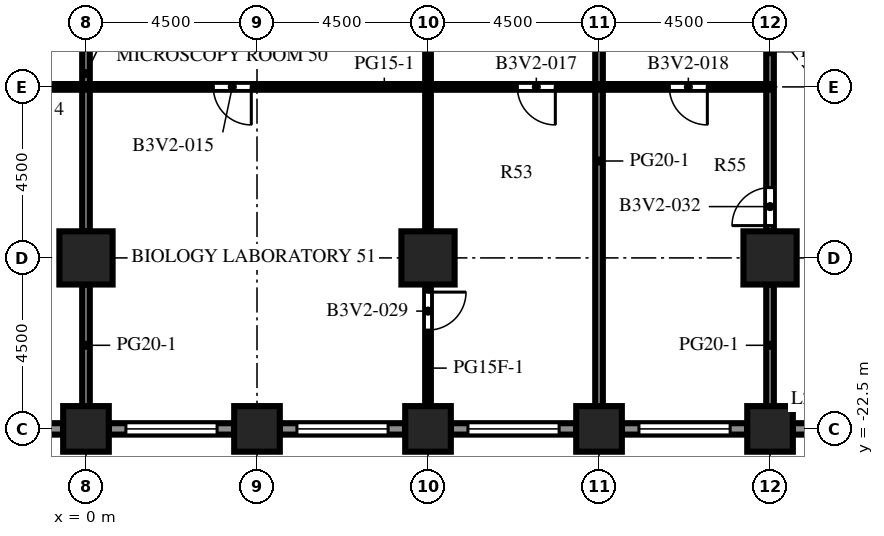
"""IFC4 building model, lengths in metres.
Left out: names, types, materials, properties, quantities, classifications, styles, units other than length and angle.
Written with IfcOpenShell. Run it as: python <this file> out.ifc"""

import sys

from ifc_helpers import new_model, si_unit, direction, frame, frame_2d, origin, origin_2d, place, context, subcontext, project, spatial, rectangle, extrude, element, fill, save


model = new_model("IFC4")
c1 = context("Model", 3, precision=1e-05, world=origin(), true_north=direction((0.0, 1.0)))
c2 = subcontext(c1, "Body", "Model", "MODEL_VIEW")
j1 = project(units=[si_unit("LENGTHUNIT", "METRE"), si_unit("PLANEANGLEUNIT", "RADIAN")], contexts=[c1])
p1 = place(None, origin())
s1 = spatial("IfcSite", under=j1, at=p1, CompositionType="ELEMENT")
p2 = place(p1, origin())
s2 = spatial("IfcBuilding", under=s1, at=p2, CompositionType="ELEMENT")
p3 = place(p2, frame((0.0, 0.0, 98.4)))
s3 = spatial("IfcBuildingStorey", under=s2, at=p3, CompositionType="ELEMENT", Elevation=98.4)
for number, where, z_axis, x_axis in (
    (1, (0.0, -22.5, 0.0), (0.0, 0.0, 1.0), (1.0, 0.0, 0.0)),
    (2, (4.5, -22.5, 0.0), (0.0, 0.0, 1.0), (1.0, 0.0, 0.0)),
    (3, (9.0, -22.5, 0.0), (0.0, 0.0, 1.0), (1.0, 0.0, 0.0)),
    (4, (13.5, -22.5, 0.0), (0.0, 0.0, 1.0), (1.0, 0.0, 0.0)),
    (5, (18.0, -22.5, 0.0), (0.0, 0.0, 1.0), (1.0, 0.0, 0.0)),
):
    element("IfcColumn", number, at=place(p3, frame(where, z_axis=z_axis, x_axis=x_axis)), inside=s3, PredefinedType="COLUMN", context=c2, shape_type="SweptSolid", body=[
        extrude(rectangle(XDim=1.2, YDim=1.2, at=origin_2d()), origin(), (0.0, 0.0, 1.0), 4.1),
    ])
for number, where, z_axis, x_axis in (
    (6, (0.0, -18.0, 0.0), (0.0, 0.0, 1.0), (1.0, 0.0, 0.0)),
    (7, (9.0, -18.0, 0.0), (0.0, 0.0, 1.0), (1.0, 0.0, 0.0)),
    (8, (18.0, -18.0, 0.0), (0.0, 0.0, 1.0), (1.0, 0.0, 0.0)),
):
    element("IfcColumn", number, at=place(p3, frame(where, z_axis=z_axis, x_axis=x_axis)), inside=s3, PredefinedType="COLUMN", context=c2, shape_type="SweptSolid", body=[
        extrude(rectangle(XDim=1.4, YDim=1.4, at=origin_2d()), origin(), (0.0, 0.0, 1.0), 4.1),
    ])
p4 = place(p3, frame((-0.6, -22.5, 0.0), z_axis=(0.0, 0.0, 1.0), x_axis=(-1.0, 0.0, 0.0)))
e9 = element("IfcWall", 9, at=p4, inside=s3, PredefinedType="SOLIDWALL", context=c2, shape_type="SweptSolid", body=[
    extrude(rectangle(XDim=3.3, YDim=0.3, at=frame_2d((1.65, 0.0))), origin(), (0.0, 0.0, 1.0), 2.75),
])
p5 = place(p4, frame((0.45, 0.0, 0.8)))
e10 = element("IfcOpeningElement", 10, at=p5, cuts=e9, PredefinedType="OPENING", context=c2, shape_type="SweptSolid", body=[
    extrude(rectangle(XDim=2.4, YDim=1.7, at=frame_2d((1.2, 0.85))), frame((0.0, 0.16, 0.0), z_axis=(0.0, -1.0, 0.0), x_axis=(1.0, 0.0, 0.0)), (0.0, 0.0, 1.0), 0.32),
])
p6 = place(p3, frame((3.9, -22.5, 0.0), z_axis=(0.0, 0.0, 1.0), x_axis=(-1.0, 0.0, 0.0)))
e11 = element("IfcWall", 11, at=p6, inside=s3, PredefinedType="SOLIDWALL", context=c2, shape_type="SweptSolid", body=[
    extrude(rectangle(XDim=3.3, YDim=0.3, at=frame_2d((1.65, 0.0))), origin(), (0.0, 0.0, 1.0), 2.75),
])
p7 = place(p6, frame((0.45, 0.0, 0.8)))
e12 = element("IfcOpeningElement", 12, at=p7, cuts=e11, PredefinedType="OPENING", context=c2, shape_type="SweptSolid", body=[
    extrude(rectangle(XDim=2.4, YDim=1.7, at=frame_2d((1.2, 0.85))), frame((0.0, 0.16, 0.0), z_axis=(0.0, -1.0, 0.0), x_axis=(1.0, 0.0, 0.0)), (0.0, 0.0, 1.0), 0.32),
])
p8 = place(p3, frame((8.4, -22.5, 0.0), z_axis=(0.0, 0.0, 1.0), x_axis=(-1.0, 0.0, 0.0)))
e13 = element("IfcWall", 13, at=p8, inside=s3, PredefinedType="SOLIDWALL", context=c2, shape_type="SweptSolid", body=[
    extrude(rectangle(XDim=3.3, YDim=0.3, at=frame_2d((1.65, 0.0))), origin(), (0.0, 0.0, 1.0), 2.75),
])
p9 = place(p8, frame((0.45, 0.0, 0.8)))
e14 = element("IfcOpeningElement", 14, at=p9, cuts=e13, PredefinedType="OPENING", context=c2, shape_type="SweptSolid", body=[
    extrude(rectangle(XDim=2.4, YDim=1.7, at=frame_2d((1.2, 0.85))), frame((0.0, 0.16, 0.0), z_axis=(0.0, -1.0, 0.0), x_axis=(1.0, 0.0, 0.0)), (0.0, 0.0, 1.0), 0.32),
])
p10 = place(p3, frame((12.9, -22.5, 0.0), z_axis=(0.0, 0.0, 1.0), x_axis=(-1.0, 0.0, 0.0)))
e15 = element("IfcWall", 15, at=p10, inside=s3, PredefinedType="SOLIDWALL", context=c2, shape_type="SweptSolid", body=[
    extrude(rectangle(XDim=3.3, YDim=0.3, at=frame_2d((1.65, 0.0))), origin(), (0.0, 0.0, 1.0), 2.75),
])
p11 = place(p10, frame((0.45, 0.0, 0.8)))
e16 = element("IfcOpeningElement", 16, at=p11, cuts=e15, PredefinedType="OPENING", context=c2, shape_type="SweptSolid", body=[
    extrude(rectangle(XDim=2.4, YDim=1.7, at=frame_2d((1.2, 0.85))), frame((0.0, 0.16, 0.0), z_axis=(0.0, -1.0, 0.0), x_axis=(1.0, 0.0, 0.0)), (0.0, 0.0, 1.0), 0.32),
])
p12 = place(p3, frame((17.4, -22.5, 0.0), z_axis=(0.0, 0.0, 1.0), x_axis=(-1.0, 0.0, 0.0)))
e17 = element("IfcWall", 17, at=p12, inside=s3, PredefinedType="SOLIDWALL", context=c2, shape_type="SweptSolid", body=[
    extrude(rectangle(XDim=3.3, YDim=0.3, at=frame_2d((1.65, 0.0))), origin(), (0.0, 0.0, 1.0), 2.75),
])
p13 = place(p12, frame((0.45, 0.0, 0.8)))
e18 = element("IfcOpeningElement", 18, at=p13, cuts=e17, PredefinedType="OPENING", context=c2, shape_type="SweptSolid", body=[
    extrude(rectangle(XDim=2.4, YDim=1.7, at=frame_2d((1.2, 0.85))), frame((0.0, 0.16, 0.0), z_axis=(0.0, -1.0, 0.0), x_axis=(1.0, 0.0, 0.0)), (0.0, 0.0, 1.0), 0.32),
])
p14 = place(p3, frame((21.9, -22.5, 0.0), z_axis=(0.0, 0.0, 1.0), x_axis=(-1.0, 0.0, 0.0)))
e19 = element("IfcWall", 19, at=p14, inside=s3, PredefinedType="SOLIDWALL", context=c2, shape_type="SweptSolid", body=[
    extrude(rectangle(XDim=3.3, YDim=0.3, at=frame_2d((1.65, 0.0))), origin(), (0.0, 0.0, 1.0), 2.75),
])
p15 = place(p14, frame((1.15, 0.0, 0.0)))
e20 = element("IfcOpeningElement", 20, at=p15, cuts=e19, PredefinedType="OPENING", context=c2, shape_type="SweptSolid", body=[
    extrude(rectangle(XDim=1.0, YDim=2.2, at=frame_2d((0.5, 1.1))), frame((0.0, 0.16, 0.0), z_axis=(0.0, -1.0, 0.0), x_axis=(1.0, 0.0, 0.0)), (0.0, 0.0, 1.0), 0.32),
])
p16 = place(p3, frame((0.0, -21.9, 0.0), z_axis=(0.0, 0.0, 1.0), x_axis=(0.0, 1.0, 0.0)))
e21 = element("IfcWall", 21, at=p16, inside=s3, PredefinedType="PARTITIONING", context=c2, shape_type="SweptSolid", body=[
    extrude(rectangle(XDim=3.2, YDim=0.2, at=frame_2d((1.6, 0.0))), origin(), (0.0, 0.0, 1.0), 3.65),
])
p17 = place(p3, frame((0.0, -17.3, 0.0), z_axis=(0.0, 0.0, 1.0), x_axis=(0.0, 1.0, 0.0)))
e22 = element("IfcWall", 22, at=p17, inside=s3, PredefinedType="PARTITIONING", context=c2, shape_type="SweptSolid", body=[
    extrude(rectangle(XDim=8.3, YDim=0.2, at=frame_2d((4.15, 0.0))), origin(), (0.0, 0.0, 1.0), 3.65),
])
p18 = place(p3, frame((9.0, -18.7, 0.0), z_axis=(0.0, 0.0, 1.0), x_axis=(0.0, -1.0, 0.0)))
e23 = element("IfcWall", 23, at=p18, inside=s3, PredefinedType="PARTITIONING", context=c2, shape_type="SweptSolid", body=[
    extrude(rectangle(XDim=3.2, YDim=0.15, at=frame_2d((1.6, 0.0))), origin(), (0.0, 0.0, 1.0), 3.65),
])
p19 = place(p18, frame((0.2, 0.0, 0.0)))
e24 = element("IfcOpeningElement", 24, at=p19, cuts=e23, PredefinedType="OPENING", context=c2, shape_type="SweptSolid", body=[
    extrude(rectangle(XDim=1.0, YDim=2.1, at=frame_2d((0.5, 1.05))), frame((0.0, 0.085, 0.0), z_axis=(0.0, -1.0, 0.0), x_axis=(1.0, 0.0, 0.0)), (0.0, 0.0, 1.0), 0.17),
])
p20 = place(p3, frame((9.0, -17.3, 0.0), z_axis=(0.0, 0.0, 1.0), x_axis=(0.0, 1.0, 0.0)))
e25 = element("IfcWall", 25, at=p20, inside=s3, PredefinedType="PARTITIONING", context=c2, shape_type="SweptSolid", body=[
    extrude(rectangle(XDim=8.3, YDim=0.15, at=frame_2d((4.15, 0.0))), origin(), (0.0, 0.0, 1.0), 3.65),
])
p21 = place(p3, frame((13.5, -21.9, 0.0), z_axis=(0.0, 0.0, 1.0), x_axis=(0.0, 1.0, 0.0)))
e26 = element("IfcWall", 26, at=p21, inside=s3, PredefinedType="PARTITIONING", context=c2, shape_type="SweptSolid", body=[
    extrude(rectangle(XDim=12.9, YDim=0.2, at=frame_2d((6.45, 0.0))), origin(), (0.0, 0.0, 1.0), 3.65),
])
p22 = place(p3, frame((18.0, -21.9, 0.0), z_axis=(0.0, 0.0, 1.0), x_axis=(0.0, 1.0, 0.0)))
e27 = element("IfcWall", 27, at=p22, inside=s3, PredefinedType="PARTITIONING", context=c2, shape_type="SweptSolid", body=[
    extrude(rectangle(XDim=3.2, YDim=0.2, at=frame_2d((1.6, 0.0))), origin(), (0.0, 0.0, 1.0), 3.65),
])
p23 = place(p3, frame((18.0, -17.3, 0.0), z_axis=(0.0, 0.0, 1.0), x_axis=(0.0, 1.0, 0.0)))
e28 = element("IfcWall", 28, at=p23, inside=s3, PredefinedType="PARTITIONING", context=c2, shape_type="SweptSolid", body=[
    extrude(rectangle(XDim=8.3, YDim=0.2, at=frame_2d((4.15, 0.0))), origin(), (0.0, 0.0, 1.0), 3.65),
])
p24 = place(p23, frame((0.15, 0.0, 0.0)))
e29 = element("IfcOpeningElement", 29, at=p24, cuts=e28, PredefinedType="OPENING", context=c2, shape_type="SweptSolid", body=[
    extrude(rectangle(XDim=1.0, YDim=2.1, at=frame_2d((0.5, 1.05))), frame((0.0, 0.11, 0.0), z_axis=(0.0, -1.0, 0.0), x_axis=(1.0, 0.0, 0.0)), (0.0, 0.0, 1.0), 0.22),
])
p25 = place(p3, frame((-10.5, -13.5, 0.0), z_axis=(0.0, 0.0, 1.0), x_axis=(1.0, 0.0, 0.0)))
e30 = element("IfcWall", 30, at=p25, inside=s3, PredefinedType="PARTITIONING", context=c2, shape_type="SweptSolid", body=[
    extrude(rectangle(XDim=28.5, YDim=0.15, at=frame_2d((14.25, 0.0))), origin(), (0.0, 0.0, 1.0), 3.65),
])
p26 = place(p25, frame((3.1, 0.0, 0.0)))
e31 = element("IfcOpeningElement", 31, at=p26, cuts=e30, PredefinedType="OPENING", context=c2, shape_type="SweptSolid", body=[
    extrude(rectangle(XDim=1.0, YDim=2.1, at=frame_2d((0.5, 1.05))), frame((0.0, 0.085, 0.0), z_axis=(0.0, -1.0, 0.0), x_axis=(1.0, 0.0, 0.0)), (0.0, 0.0, 1.0), 0.17),
])
p27 = place(p25, frame((8.35, 0.0, 0.0)))
e32 = element("IfcOpeningElement", 32, at=p27, cuts=e30, PredefinedType="OPENING", context=c2, shape_type="SweptSolid", body=[
    extrude(rectangle(XDim=1.0, YDim=2.1, at=frame_2d((0.5, 1.05))), frame((0.0, 0.085, 0.0), z_axis=(0.0, -1.0, 0.0), x_axis=(1.0, 0.0, 0.0)), (0.0, 0.0, 1.0), 0.17),
])
p28 = place(p25, frame((13.85, 0.0, 0.0)))
e33 = element("IfcOpeningElement", 33, at=p28, cuts=e30, PredefinedType="OPENING", context=c2, shape_type="SweptSolid", body=[
    extrude(rectangle(XDim=1.0, YDim=2.1, at=frame_2d((0.5, 1.05))), frame((0.0, 0.085, 0.0), z_axis=(0.0, -1.0, 0.0), x_axis=(1.0, 0.0, 0.0)), (0.0, 0.0, 1.0), 0.17),
])
p29 = place(p25, frame((21.85, 0.0, 0.0)))
e34 = element("IfcOpeningElement", 34, at=p29, cuts=e30, PredefinedType="OPENING", context=c2, shape_type="SweptSolid", body=[
    extrude(rectangle(XDim=1.0, YDim=2.1, at=frame_2d((0.5, 1.05))), frame((0.0, 0.085, 0.0), z_axis=(0.0, -1.0, 0.0), x_axis=(1.0, 0.0, 0.0)), (0.0, 0.0, 1.0), 0.17),
])
p30 = place(p25, frame((25.85, 0.0, 0.0)))
e35 = element("IfcOpeningElement", 35, at=p30, cuts=e30, PredefinedType="OPENING", context=c2, shape_type="SweptSolid", body=[
    extrude(rectangle(XDim=1.0, YDim=2.1, at=frame_2d((0.5, 1.05))), frame((0.0, 0.085, 0.0), z_axis=(0.0, -1.0, 0.0), x_axis=(1.0, 0.0, 0.0)), (0.0, 0.0, 1.0), 0.17),
])
p31 = place(p7, origin())
e36 = element("IfcWindow", 36, at=p31, inside=s3, PartitioningType="SINGLE_PANEL", PredefinedType="WINDOW", context=c2, shape_type="SweptSolid", body=[
    extrude(rectangle(XDim=2.4, YDim=1.7, at=frame_2d((1.2, 0.85))), frame((0.0, 0.03, 0.0), z_axis=(0.0, -1.0, 0.0), x_axis=(1.0, 0.0, 0.0)), (0.0, 0.0, 1.0), 0.06),
])
fill(e12, e36)
p32 = place(p9, origin())
e37 = element("IfcWindow", 37, at=p32, inside=s3, PartitioningType="SINGLE_PANEL", PredefinedType="WINDOW", context=c2, shape_type="SweptSolid", body=[
    extrude(rectangle(XDim=2.4, YDim=1.7, at=frame_2d((1.2, 0.85))), frame((0.0, 0.03, 0.0), z_axis=(0.0, -1.0, 0.0), x_axis=(1.0, 0.0, 0.0)), (0.0, 0.0, 1.0), 0.06),
])
fill(e14, e37)
p33 = place(p11, origin())
e38 = element("IfcWindow", 38, at=p33, inside=s3, PartitioningType="SINGLE_PANEL", PredefinedType="WINDOW", context=c2, shape_type="SweptSolid", body=[
    extrude(rectangle(XDim=2.4, YDim=1.7, at=frame_2d((1.2, 0.85))), frame((0.0, 0.03, 0.0), z_axis=(0.0, -1.0, 0.0), x_axis=(1.0, 0.0, 0.0)), (0.0, 0.0, 1.0), 0.06),
])
fill(e16, e38)
p34 = place(p13, origin())
e39 = element("IfcWindow", 39, at=p34, inside=s3, PartitioningType="SINGLE_PANEL", PredefinedType="WINDOW", context=c2, shape_type="SweptSolid", body=[
    extrude(rectangle(XDim=2.4, YDim=1.7, at=frame_2d((1.2, 0.85))), frame((0.0, 0.03, 0.0), z_axis=(0.0, -1.0, 0.0), x_axis=(1.0, 0.0, 0.0)), (0.0, 0.0, 1.0), 0.06),
])
fill(e18, e39)
p35 = place(p28, origin())
e40 = element("IfcDoor", 40, at=p35, inside=s3, OperationType="SINGLE_SWING_RIGHT", PredefinedType="DOOR", context=c2, shape_type="SweptSolid", body=[
    extrude(rectangle(XDim=1.0, YDim=2.1, at=frame_2d((0.5, 1.05))), frame((0.0, 0.025, 0.0), z_axis=(0.0, -1.0, 0.0), x_axis=(1.0, 0.0, 0.0)), (0.0, 0.0, 1.0), 0.05),
])
fill(e33, e40)
p36 = place(p29, origin())
e41 = element("IfcDoor", 41, at=p36, inside=s3, OperationType="SINGLE_SWING_RIGHT", PredefinedType="DOOR", context=c2, shape_type="SweptSolid", body=[
    extrude(rectangle(XDim=1.0, YDim=2.1, at=frame_2d((0.5, 1.05))), frame((0.0, 0.025, 0.0), z_axis=(0.0, -1.0, 0.0), x_axis=(1.0, 0.0, 0.0)), (0.0, 0.0, 1.0), 0.05),
])
fill(e34, e41)
p37 = place(p30, origin())
e42 = element("IfcDoor", 42, at=p37, inside=s3, OperationType="SINGLE_SWING_RIGHT", PredefinedType="DOOR", context=c2, shape_type="SweptSolid", body=[
    extrude(rectangle(XDim=1.0, YDim=2.1, at=frame_2d((0.5, 1.05))), frame((0.0, 0.025, 0.0), z_axis=(0.0, -1.0, 0.0), x_axis=(1.0, 0.0, 0.0)), (0.0, 0.0, 1.0), 0.05),
])
fill(e35, e42)
p38 = place(p19, origin())
e43 = element("IfcDoor", 43, at=p38, inside=s3, OperationType="SINGLE_SWING_LEFT", PredefinedType="DOOR", context=c2, shape_type="SweptSolid", body=[
    extrude(rectangle(XDim=1.0, YDim=2.1, at=frame_2d((0.5, 1.05))), frame((0.0, 0.025, 0.0), z_axis=(0.0, -1.0, 0.0), x_axis=(1.0, 0.0, 0.0)), (0.0, 0.0, 1.0), 0.05),
])
fill(e24, e43)
p39 = place(p24, origin())
e44 = element("IfcDoor", 44, at=p39, inside=s3, OperationType="SINGLE_SWING_LEFT", PredefinedType="DOOR", context=c2, shape_type="SweptSolid", body=[
    extrude(rectangle(XDim=1.0, YDim=2.1, at=frame_2d((0.5, 1.05))), frame((0.0, 0.025, 0.0), z_axis=(0.0, -1.0, 0.0), x_axis=(1.0, 0.0, 0.0)), (0.0, 0.0, 1.0), 0.05),
])
fill(e29, e44)
save(model, sys.argv[1])
